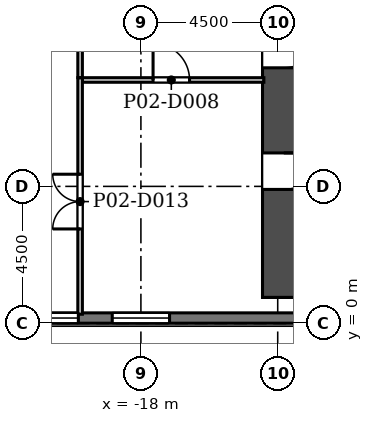
"""IFC4 building model, lengths in metres.
Left out: names, types, materials, properties, quantities, classifications, styles, units other than length and angle.
Written with IfcOpenShell. Run it as: python <this file> out.ifc"""

import sys

from ifc_helpers import new_model, si_unit, direction, frame, frame_2d, origin, place, context, subcontext, project, spatial, rectangle, extrude, element, fill, save


model = new_model("IFC4")
c1 = context("Model", 3, precision=1e-05, world=origin(), true_north=direction((0.0, 1.0)))
c2 = subcontext(c1, "Body", "Model", "MODEL_VIEW")
j1 = project(units=[si_unit("LENGTHUNIT", "METRE"), si_unit("PLANEANGLEUNIT", "RADIAN")], contexts=[c1])
p1 = place(None, origin())
s1 = spatial("IfcSite", under=j1, at=p1, CompositionType="ELEMENT")
p2 = place(p1, origin())
s2 = spatial("IfcBuilding", under=s1, at=p2, CompositionType="ELEMENT")
p3 = place(p2, frame((0.0, 0.0, 14.0)))
s3 = spatial("IfcBuildingStorey", under=s2, at=p3, CompositionType="ELEMENT", Elevation=14.0)
p4 = place(p3, frame((-14.0, 1.55, 0.0), z_axis=(0.0, 0.0, 1.0), x_axis=(1.0, 0.0, 0.0)))
e1 = element("IfcWall", 1, at=p4, inside=s3, PredefinedType="SHEAR", context=c2, shape_type="SweptSolid", body=[
    extrude(rectangle(XDim=28.0, YDim=1.4, at=frame_2d((14.0, 0.0))), origin(), (0.0, 0.0, 1.0), 6.0),
])
p5 = place(p3, frame((-13.3, 11.052, 0.0), z_axis=(0.0, 0.0, 1.0), x_axis=(0.0, -1.0, 0.0)))
e2 = element("IfcWall", 2, at=p5, inside=s3, PredefinedType="SHEAR", context=c2, shape_type="SweptSolid", body=[
    extrude(rectangle(XDim=10.202, YDim=1.4, at=frame_2d((5.101, 0.0))), origin(), (0.0, 0.0, 1.0), 6.0),
])
p6 = place(p5, frame((5.453, 0.0, 0.0)))
e3 = element("IfcOpeningElement", 3, at=p6, cuts=e2, PredefinedType="OPENING", context=c2, shape_type="SweptSolid", body=[
    extrude(rectangle(XDim=1.2, YDim=2.1, at=frame_2d((0.6, 1.05))), frame((0.0, 0.71, 0.0), z_axis=(0.0, -1.0, 0.0), x_axis=(1.0, 0.0, 0.0)), (0.0, 0.0, 1.0), 1.42),
])
p7 = place(p5, frame((1.453, 0.0, 0.0)))
e4 = element("IfcOpeningElement", 4, at=p7, cuts=e2, PredefinedType="OPENING", context=c2, shape_type="SweptSolid", body=[
    extrude(rectangle(XDim=1.2, YDim=2.1, at=frame_2d((0.6, 1.05))), frame((0.0, 0.71, 0.0), z_axis=(0.0, -1.0, 0.0), x_axis=(1.0, 0.0, 0.0)), (0.0, 0.0, 1.0), 1.42),
])
p8 = place(p3, frame((-38.0, 0.17, 0.0), z_axis=(0.0, 0.0, 1.0), x_axis=(1.0, 0.0, 0.0)))
e5 = element("IfcWall", 5, at=p8, inside=s3, PredefinedType="SOLIDWALL", context=c2, shape_type="SweptSolid", body=[
    extrude(rectangle(XDim=76.0, YDim=0.34, at=frame_2d((38.0, 0.0))), origin(), (0.0, 0.0, 1.0), 5.7),
])
p9 = place(p8, frame((1.058, 0.0, 0.9)))
e6 = element("IfcOpeningElement", 6, at=p9, cuts=e5, PredefinedType="OPENING", context=c2, shape_type="SweptSolid", body=[
    extrude(rectangle(XDim=1.885, YDim=3.5, at=frame_2d((0.942, 1.75))), frame((0.0, 0.18, 0.0), z_axis=(0.0, -1.0, 0.0), x_axis=(1.0, 0.0, 0.0)), (0.0, 0.0, 1.0), 0.36),
])
p10 = place(p8, frame((4.058, 0.0, 0.9)))
e7 = element("IfcOpeningElement", 7, at=p10, cuts=e5, PredefinedType="OPENING", context=c2, shape_type="SweptSolid", body=[
    extrude(rectangle(XDim=1.885, YDim=3.5, at=frame_2d((0.942, 1.75))), frame((0.0, 0.18, 0.0), z_axis=(0.0, -1.0, 0.0), x_axis=(1.0, 0.0, 0.0)), (0.0, 0.0, 1.0), 0.36),
])
p11 = place(p8, frame((7.058, 0.0, 0.9)))
e8 = element("IfcOpeningElement", 8, at=p11, cuts=e5, PredefinedType="OPENING", context=c2, shape_type="SweptSolid", body=[
    extrude(rectangle(XDim=1.885, YDim=3.5, at=frame_2d((0.942, 1.75))), frame((0.0, 0.18, 0.0), z_axis=(0.0, -1.0, 0.0), x_axis=(1.0, 0.0, 0.0)), (0.0, 0.0, 1.0), 0.36),
])
p12 = place(p8, frame((10.058, 0.0, 0.9)))
e9 = element("IfcOpeningElement", 9, at=p12, cuts=e5, PredefinedType="OPENING", context=c2, shape_type="SweptSolid", body=[
    extrude(rectangle(XDim=1.885, YDim=3.5, at=frame_2d((0.942, 1.75))), frame((0.0, 0.18, 0.0), z_axis=(0.0, -1.0, 0.0), x_axis=(1.0, 0.0, 0.0)), (0.0, 0.0, 1.0), 0.36),
])
p13 = place(p8, frame((13.058, 0.0, 0.9)))
e10 = element("IfcOpeningElement", 10, at=p13, cuts=e5, PredefinedType="OPENING", context=c2, shape_type="SweptSolid", body=[
    extrude(rectangle(XDim=1.885, YDim=3.5, at=frame_2d((0.942, 1.75))), frame((0.0, 0.18, 0.0), z_axis=(0.0, -1.0, 0.0), x_axis=(1.0, 0.0, 0.0)), (0.0, 0.0, 1.0), 0.36),
])
p14 = place(p8, frame((16.058, 0.0, 0.9)))
e11 = element("IfcOpeningElement", 11, at=p14, cuts=e5, PredefinedType="OPENING", context=c2, shape_type="SweptSolid", body=[
    extrude(rectangle(XDim=1.885, YDim=3.5, at=frame_2d((0.942, 1.75))), frame((0.0, 0.18, 0.0), z_axis=(0.0, -1.0, 0.0), x_axis=(1.0, 0.0, 0.0)), (0.0, 0.0, 1.0), 0.36),
])
p15 = place(p8, frame((19.058, 0.0, 0.9)))
e12 = element("IfcOpeningElement", 12, at=p15, cuts=e5, PredefinedType="OPENING", context=c2, shape_type="SweptSolid", body=[
    extrude(rectangle(XDim=1.885, YDim=3.5, at=frame_2d((0.942, 1.75))), frame((0.0, 0.18, 0.0), z_axis=(0.0, -1.0, 0.0), x_axis=(1.0, 0.0, 0.0)), (0.0, 0.0, 1.0), 0.36),
])
p16 = place(p8, frame((55.058, 0.0, 0.9)))
e13 = element("IfcOpeningElement", 13, at=p16, cuts=e5, PredefinedType="OPENING", context=c2, shape_type="SweptSolid", body=[
    extrude(rectangle(XDim=1.885, YDim=3.5, at=frame_2d((0.942, 1.75))), frame((0.0, 0.18, 0.0), z_axis=(0.0, -1.0, 0.0), x_axis=(1.0, 0.0, 0.0)), (0.0, 0.0, 1.0), 0.36),
])
p17 = place(p8, frame((58.058, 0.0, 0.9)))
e14 = element("IfcOpeningElement", 14, at=p17, cuts=e5, PredefinedType="OPENING", context=c2, shape_type="SweptSolid", body=[
    extrude(rectangle(XDim=1.885, YDim=3.5, at=frame_2d((0.942, 1.75))), frame((0.0, 0.18, 0.0), z_axis=(0.0, -1.0, 0.0), x_axis=(1.0, 0.0, 0.0)), (0.0, 0.0, 1.0), 0.36),
])
p18 = place(p8, frame((61.058, 0.0, 0.9)))
e15 = element("IfcOpeningElement", 15, at=p18, cuts=e5, PredefinedType="OPENING", context=c2, shape_type="SweptSolid", body=[
    extrude(rectangle(XDim=1.885, YDim=3.5, at=frame_2d((0.942, 1.75))), frame((0.0, 0.18, 0.0), z_axis=(0.0, -1.0, 0.0), x_axis=(1.0, 0.0, 0.0)), (0.0, 0.0, 1.0), 0.36),
])
p19 = place(p8, frame((64.058, 0.0, 0.9)))
e16 = element("IfcOpeningElement", 16, at=p19, cuts=e5, PredefinedType="OPENING", context=c2, shape_type="SweptSolid", body=[
    extrude(rectangle(XDim=1.885, YDim=3.5, at=frame_2d((0.942, 1.75))), frame((0.0, 0.18, 0.0), z_axis=(0.0, -1.0, 0.0), x_axis=(1.0, 0.0, 0.0)), (0.0, 0.0, 1.0), 0.36),
])
p20 = place(p8, frame((67.058, 0.0, 0.9)))
e17 = element("IfcOpeningElement", 17, at=p20, cuts=e5, PredefinedType="OPENING", context=c2, shape_type="SweptSolid", body=[
    extrude(rectangle(XDim=1.885, YDim=3.5, at=frame_2d((0.942, 1.75))), frame((0.0, 0.18, 0.0), z_axis=(0.0, -1.0, 0.0), x_axis=(1.0, 0.0, 0.0)), (0.0, 0.0, 1.0), 0.36),
])
p21 = place(p8, frame((70.058, 0.0, 0.9)))
e18 = element("IfcOpeningElement", 18, at=p21, cuts=e5, PredefinedType="OPENING", context=c2, shape_type="SweptSolid", body=[
    extrude(rectangle(XDim=1.885, YDim=3.5, at=frame_2d((0.942, 1.75))), frame((0.0, 0.18, 0.0), z_axis=(0.0, -1.0, 0.0), x_axis=(1.0, 0.0, 0.0)), (0.0, 0.0, 1.0), 0.36),
])
p22 = place(p8, frame((73.058, 0.0, 0.9)))
e19 = element("IfcOpeningElement", 19, at=p22, cuts=e5, PredefinedType="OPENING", context=c2, shape_type="SweptSolid", body=[
    extrude(rectangle(XDim=1.885, YDim=3.5, at=frame_2d((0.942, 1.75))), frame((0.0, 0.18, 0.0), z_axis=(0.0, -1.0, 0.0), x_axis=(1.0, 0.0, 0.0)), (0.0, 0.0, 1.0), 0.36),
])
p23 = place(p3, frame((-4.853, 74.393, 0.0), z_axis=(0.0, 0.0, 1.0), x_axis=(-0.49999894854, -0.866026010844, 0.0)))
e20 = element("IfcWall", 20, at=p23, inside=s3, PredefinedType="SOLIDWALL", context=c2, shape_type="SweptSolid", body=[
    extrude(rectangle(XDim=76.0, YDim=0.34, at=frame_2d((38.0, 0.0))), origin(), (0.0, 0.0, 1.0), 5.7),
])
p24 = place(p23, frame((1.058, 0.0, 0.9)))
e21 = element("IfcOpeningElement", 21, at=p24, cuts=e20, PredefinedType="OPENING", context=c2, shape_type="SweptSolid", body=[
    extrude(rectangle(XDim=1.885, YDim=3.5, at=frame_2d((0.942, 1.75))), frame((0.0, 0.18, 0.0), z_axis=(0.0, -1.0, 0.0), x_axis=(1.0, 0.0, 0.0)), (0.0, 0.0, 1.0), 0.36),
])
p25 = place(p23, frame((4.058, 0.0, 0.9)))
e22 = element("IfcOpeningElement", 22, at=p25, cuts=e20, PredefinedType="OPENING", context=c2, shape_type="SweptSolid", body=[
    extrude(rectangle(XDim=1.885, YDim=3.5, at=frame_2d((0.942, 1.75))), frame((0.0, 0.18, 0.0), z_axis=(0.0, -1.0, 0.0), x_axis=(1.0, 0.0, 0.0)), (0.0, 0.0, 1.0), 0.36),
])
p26 = place(p23, frame((7.058, 0.0, 0.9)))
e23 = element("IfcOpeningElement", 23, at=p26, cuts=e20, PredefinedType="OPENING", context=c2, shape_type="SweptSolid", body=[
    extrude(rectangle(XDim=1.885, YDim=3.5, at=frame_2d((0.942, 1.75))), frame((0.0, 0.18, 0.0), z_axis=(0.0, -1.0, 0.0), x_axis=(1.0, 0.0, 0.0)), (0.0, 0.0, 1.0), 0.36),
])
p27 = place(p23, frame((10.058, 0.0, 0.9)))
e24 = element("IfcOpeningElement", 24, at=p27, cuts=e20, PredefinedType="OPENING", context=c2, shape_type="SweptSolid", body=[
    extrude(rectangle(XDim=1.885, YDim=3.5, at=frame_2d((0.942, 1.75))), frame((0.0, 0.18, 0.0), z_axis=(0.0, -1.0, 0.0), x_axis=(1.0, 0.0, 0.0)), (0.0, 0.0, 1.0), 0.36),
])
p28 = place(p23, frame((13.058, 0.0, 0.9)))
e25 = element("IfcOpeningElement", 25, at=p28, cuts=e20, PredefinedType="OPENING", context=c2, shape_type="SweptSolid", body=[
    extrude(rectangle(XDim=1.885, YDim=3.5, at=frame_2d((0.942, 1.75))), frame((0.0, 0.18, 0.0), z_axis=(0.0, -1.0, 0.0), x_axis=(1.0, 0.0, 0.0)), (0.0, 0.0, 1.0), 0.36),
])
p29 = place(p23, frame((16.058, 0.0, 0.9)))
e26 = element("IfcOpeningElement", 26, at=p29, cuts=e20, PredefinedType="OPENING", context=c2, shape_type="SweptSolid", body=[
    extrude(rectangle(XDim=1.885, YDim=3.5, at=frame_2d((0.942, 1.75))), frame((0.0, 0.18, 0.0), z_axis=(0.0, -1.0, 0.0), x_axis=(1.0, 0.0, 0.0)), (0.0, 0.0, 1.0), 0.36),
])
p30 = place(p23, frame((19.058, 0.0, 0.9)))
e27 = element("IfcOpeningElement", 27, at=p30, cuts=e20, PredefinedType="OPENING", context=c2, shape_type="SweptSolid", body=[
    extrude(rectangle(XDim=1.885, YDim=3.5, at=frame_2d((0.942, 1.75))), frame((0.0, 0.18, 0.0), z_axis=(0.0, -1.0, 0.0), x_axis=(1.0, 0.0, 0.0)), (0.0, 0.0, 1.0), 0.36),
])
p31 = place(p23, frame((22.058, 0.0, 0.9)))
e28 = element("IfcOpeningElement", 28, at=p31, cuts=e20, PredefinedType="OPENING", context=c2, shape_type="SweptSolid", body=[
    extrude(rectangle(XDim=1.885, YDim=3.5, at=frame_2d((0.942, 1.75))), frame((0.0, 0.18, 0.0), z_axis=(0.0, -1.0, 0.0), x_axis=(1.0, 0.0, 0.0)), (0.0, 0.0, 1.0), 0.36),
])
p32 = place(p23, frame((25.058, 0.0, 0.9)))
e29 = element("IfcOpeningElement", 29, at=p32, cuts=e20, PredefinedType="OPENING", context=c2, shape_type="SweptSolid", body=[
    extrude(rectangle(XDim=1.885, YDim=3.5, at=frame_2d((0.942, 1.75))), frame((0.0, 0.18, 0.0), z_axis=(0.0, -1.0, 0.0), x_axis=(1.0, 0.0, 0.0)), (0.0, 0.0, 1.0), 0.36),
])
p33 = place(p23, frame((28.058, 0.0, 0.9)))
e30 = element("IfcOpeningElement", 30, at=p33, cuts=e20, PredefinedType="OPENING", context=c2, shape_type="SweptSolid", body=[
    extrude(rectangle(XDim=1.885, YDim=3.5, at=frame_2d((0.942, 1.75))), frame((0.0, 0.18, 0.0), z_axis=(0.0, -1.0, 0.0), x_axis=(1.0, 0.0, 0.0)), (0.0, 0.0, 1.0), 0.36),
])
p34 = place(p23, frame((31.058, 0.0, 0.9)))
e31 = element("IfcOpeningElement", 31, at=p34, cuts=e20, PredefinedType="OPENING", context=c2, shape_type="SweptSolid", body=[
    extrude(rectangle(XDim=1.885, YDim=3.5, at=frame_2d((0.942, 1.75))), frame((0.0, 0.18, 0.0), z_axis=(0.0, -1.0, 0.0), x_axis=(1.0, 0.0, 0.0)), (0.0, 0.0, 1.0), 0.36),
])
p35 = place(p23, frame((34.058, 0.0, 0.9)))
e32 = element("IfcOpeningElement", 32, at=p35, cuts=e20, PredefinedType="OPENING", context=c2, shape_type="SweptSolid", body=[
    extrude(rectangle(XDim=1.885, YDim=3.5, at=frame_2d((0.942, 1.75))), frame((0.0, 0.18, 0.0), z_axis=(0.0, -1.0, 0.0), x_axis=(1.0, 0.0, 0.0)), (0.0, 0.0, 1.0), 0.36),
])
p36 = place(p23, frame((37.058, 0.0, 0.9)))
e33 = element("IfcOpeningElement", 33, at=p36, cuts=e20, PredefinedType="OPENING", context=c2, shape_type="SweptSolid", body=[
    extrude(rectangle(XDim=1.885, YDim=3.5, at=frame_2d((0.942, 1.75))), frame((0.0, 0.18, 0.0), z_axis=(0.0, -1.0, 0.0), x_axis=(1.0, 0.0, 0.0)), (0.0, 0.0, 1.0), 0.36),
])
p37 = place(p23, frame((40.058, 0.0, 0.9)))
e34 = element("IfcOpeningElement", 34, at=p37, cuts=e20, PredefinedType="OPENING", context=c2, shape_type="SweptSolid", body=[
    extrude(rectangle(XDim=1.885, YDim=3.5, at=frame_2d((0.942, 1.75))), frame((0.0, 0.18, 0.0), z_axis=(0.0, -1.0, 0.0), x_axis=(1.0, 0.0, 0.0)), (0.0, 0.0, 1.0), 0.36),
])
p38 = place(p23, frame((43.058, 0.0, 0.9)))
e35 = element("IfcOpeningElement", 35, at=p38, cuts=e20, PredefinedType="OPENING", context=c2, shape_type="SweptSolid", body=[
    extrude(rectangle(XDim=1.885, YDim=3.5, at=frame_2d((0.942, 1.75))), frame((0.0, 0.18, 0.0), z_axis=(0.0, -1.0, 0.0), x_axis=(1.0, 0.0, 0.0)), (0.0, 0.0, 1.0), 0.36),
])
p39 = place(p23, frame((46.058, 0.0, 0.9)))
e36 = element("IfcOpeningElement", 36, at=p39, cuts=e20, PredefinedType="OPENING", context=c2, shape_type="SweptSolid", body=[
    extrude(rectangle(XDim=1.885, YDim=3.5, at=frame_2d((0.942, 1.75))), frame((0.0, 0.18, 0.0), z_axis=(0.0, -1.0, 0.0), x_axis=(1.0, 0.0, 0.0)), (0.0, 0.0, 1.0), 0.36),
])
p40 = place(p23, frame((49.058, 0.0, 0.9)))
e37 = element("IfcOpeningElement", 37, at=p40, cuts=e20, PredefinedType="OPENING", context=c2, shape_type="SweptSolid", body=[
    extrude(rectangle(XDim=1.885, YDim=3.5, at=frame_2d((0.942, 1.75))), frame((0.0, 0.18, 0.0), z_axis=(0.0, -1.0, 0.0), x_axis=(1.0, 0.0, 0.0)), (0.0, 0.0, 1.0), 0.36),
])
p41 = place(p23, frame((52.058, 0.0, 0.9)))
e38 = element("IfcOpeningElement", 38, at=p41, cuts=e20, PredefinedType="OPENING", context=c2, shape_type="SweptSolid", body=[
    extrude(rectangle(XDim=1.885, YDim=3.5, at=frame_2d((0.942, 1.75))), frame((0.0, 0.18, 0.0), z_axis=(0.0, -1.0, 0.0), x_axis=(1.0, 0.0, 0.0)), (0.0, 0.0, 1.0), 0.36),
])
p42 = place(p23, frame((55.058, 0.0, 0.9)))
e39 = element("IfcOpeningElement", 39, at=p42, cuts=e20, PredefinedType="OPENING", context=c2, shape_type="SweptSolid", body=[
    extrude(rectangle(XDim=1.885, YDim=3.5, at=frame_2d((0.942, 1.75))), frame((0.0, 0.18, 0.0), z_axis=(0.0, -1.0, 0.0), x_axis=(1.0, 0.0, 0.0)), (0.0, 0.0, 1.0), 0.36),
])
p43 = place(p23, frame((58.058, 0.0, 0.9)))
e40 = element("IfcOpeningElement", 40, at=p43, cuts=e20, PredefinedType="OPENING", context=c2, shape_type="SweptSolid", body=[
    extrude(rectangle(XDim=1.885, YDim=3.5, at=frame_2d((0.942, 1.75))), frame((0.0, 0.18, 0.0), z_axis=(0.0, -1.0, 0.0), x_axis=(1.0, 0.0, 0.0)), (0.0, 0.0, 1.0), 0.36),
])
p44 = place(p23, frame((61.058, 0.0, 0.9)))
e41 = element("IfcOpeningElement", 41, at=p44, cuts=e20, PredefinedType="OPENING", context=c2, shape_type="SweptSolid", body=[
    extrude(rectangle(XDim=1.885, YDim=3.5, at=frame_2d((0.942, 1.75))), frame((0.0, 0.18, 0.0), z_axis=(0.0, -1.0, 0.0), x_axis=(1.0, 0.0, 0.0)), (0.0, 0.0, 1.0), 0.36),
])
p45 = place(p23, frame((64.058, 0.0, 0.9)))
e42 = element("IfcOpeningElement", 42, at=p45, cuts=e20, PredefinedType="OPENING", context=c2, shape_type="SweptSolid", body=[
    extrude(rectangle(XDim=1.885, YDim=3.5, at=frame_2d((0.942, 1.75))), frame((0.0, 0.18, 0.0), z_axis=(0.0, -1.0, 0.0), x_axis=(1.0, 0.0, 0.0)), (0.0, 0.0, 1.0), 0.36),
])
p46 = place(p23, frame((67.058, 0.0, 0.9)))
e43 = element("IfcOpeningElement", 43, at=p46, cuts=e20, PredefinedType="OPENING", context=c2, shape_type="SweptSolid", body=[
    extrude(rectangle(XDim=1.885, YDim=3.5, at=frame_2d((0.942, 1.75))), frame((0.0, 0.18, 0.0), z_axis=(0.0, -1.0, 0.0), x_axis=(1.0, 0.0, 0.0)), (0.0, 0.0, 1.0), 0.36),
])
p47 = place(p23, frame((70.058, 0.0, 0.9)))
e44 = element("IfcOpeningElement", 44, at=p47, cuts=e20, PredefinedType="OPENING", context=c2, shape_type="SweptSolid", body=[
    extrude(rectangle(XDim=1.885, YDim=3.5, at=frame_2d((0.942, 1.75))), frame((0.0, 0.18, 0.0), z_axis=(0.0, -1.0, 0.0), x_axis=(1.0, 0.0, 0.0)), (0.0, 0.0, 1.0), 0.36),
])
p48 = place(p23, frame((73.058, 0.0, 0.9)))
e45 = element("IfcOpeningElement", 45, at=p48, cuts=e20, PredefinedType="OPENING", context=c2, shape_type="SweptSolid", body=[
    extrude(rectangle(XDim=1.885, YDim=3.5, at=frame_2d((0.942, 1.75))), frame((0.0, 0.18, 0.0), z_axis=(0.0, -1.0, 0.0), x_axis=(1.0, 0.0, 0.0)), (0.0, 0.0, 1.0), 0.36),
])
p49 = place(p3, frame((-19.925, 8.0, 0.0), z_axis=(0.0, 0.0, 1.0), x_axis=(1.0, 0.0, 0.0)))
e46 = element("IfcWall", 46, at=p49, inside=s3, PredefinedType="PARTITIONING", context=c2, shape_type="SweptSolid", body=[
    extrude(rectangle(XDim=5.97, YDim=0.15, at=frame_2d((2.985, 0.0))), origin(), (0.0, 0.0, 1.0), 5.7),
])
p50 = place(p49, frame((2.325, 0.0, 0.0)))
e47 = element("IfcOpeningElement", 47, at=p50, cuts=e46, PredefinedType="OPENING", context=c2, shape_type="SweptSolid", body=[
    extrude(rectangle(XDim=1.2, YDim=2.1, at=frame_2d((0.6, 1.05))), frame((0.0, 0.085, 0.0), z_axis=(0.0, -1.0, 0.0), x_axis=(1.0, 0.0, 0.0)), (0.0, 0.0, 1.0), 0.17),
])
p51 = place(p3, frame((-20.0, 8.075, 0.0), z_axis=(0.0, 0.0, 1.0), x_axis=(0.0, -1.0, 0.0)))
e48 = element("IfcWall", 48, at=p51, inside=s3, PredefinedType="PARTITIONING", context=c2, shape_type="SweptSolid", body=[
    extrude(rectangle(XDim=7.78, YDim=0.15, at=frame_2d((3.89, 0.0))), origin(), (0.0, 0.0, 1.0), 5.7),
])
p52 = place(p51, frame((3.175, 0.0, 0.0)))
e49 = element("IfcOpeningElement", 49, at=p52, cuts=e48, PredefinedType="OPENING", context=c2, shape_type="SweptSolid", body=[
    extrude(rectangle(XDim=1.8, YDim=2.1, at=frame_2d((0.9, 1.05))), frame((0.0, 0.085, 0.0), z_axis=(0.0, -1.0, 0.0), x_axis=(1.0, 0.0, 0.0)), (0.0, 0.0, 1.0), 0.17),
])
p53 = place(p3, frame((-20.0, 9.925, 0.0), z_axis=(0.0, 0.0, 1.0), x_axis=(0.0, -1.0, 0.0)))
e50 = element("IfcWall", 50, at=p53, inside=s3, PredefinedType="PARTITIONING", context=c2, shape_type="SweptSolid", body=[
    extrude(rectangle(XDim=1.85, YDim=0.15, at=frame_2d((0.925, 0.0))), origin(), (0.0, 0.0, 1.0), 5.7),
])
p54 = place(p14, origin())
e51 = element("IfcWindow", 51, at=p54, inside=s3, PartitioningType="SINGLE_PANEL", PredefinedType="WINDOW", context=c2, shape_type="SweptSolid", body=[
    extrude(rectangle(XDim=1.885, YDim=3.5, at=frame_2d((0.942, 1.75))), frame((0.0, 0.11, 0.0), z_axis=(0.0, -1.0, 0.0), x_axis=(1.0, 0.0, 0.0)), (0.0, 0.0, 1.0), 0.06),
])
fill(e11, e51)
p55 = place(p15, origin())
e52 = element("IfcWindow", 52, at=p55, inside=s3, PartitioningType="SINGLE_PANEL", PredefinedType="WINDOW", context=c2, shape_type="SweptSolid", body=[
    extrude(rectangle(XDim=1.885, YDim=3.5, at=frame_2d((0.942, 1.75))), frame((0.0, 0.11, 0.0), z_axis=(0.0, -1.0, 0.0), x_axis=(1.0, 0.0, 0.0)), (0.0, 0.0, 1.0), 0.06),
])
fill(e12, e52)
p56 = place(p6, origin())
e53 = element("IfcDoor", 53, at=p56, inside=s3, OperationType="SINGLE_SWING_LEFT", PredefinedType="DOOR", context=c2, shape_type="SweptSolid", body=[
    extrude(rectangle(XDim=1.2, YDim=2.1, at=frame_2d((0.6, 1.05))), frame((0.0, 0.025, 0.0), z_axis=(0.0, -1.0, 0.0), x_axis=(1.0, 0.0, 0.0)), (0.0, 0.0, 1.0), 0.05),
])
fill(e3, e53)
p57 = place(p7, origin())
e54 = element("IfcDoor", 54, at=p57, inside=s3, OperationType="SINGLE_SWING_LEFT", PredefinedType="DOOR", context=c2, shape_type="SweptSolid", body=[
    extrude(rectangle(XDim=1.2, YDim=2.1, at=frame_2d((0.6, 1.05))), frame((0.0, 0.025, 0.0), z_axis=(0.0, -1.0, 0.0), x_axis=(1.0, 0.0, 0.0)), (0.0, 0.0, 1.0), 0.05),
])
fill(e4, e54)
p58 = place(p50, origin())
e55 = element("IfcDoor", 55, at=p58, inside=s3, OperationType="SINGLE_SWING_LEFT", PredefinedType="DOOR", context=c2, shape_type="SweptSolid", body=[
    extrude(rectangle(XDim=1.2, YDim=2.1, at=frame_2d((0.6, 1.05))), frame((0.0, 0.025, 0.0), z_axis=(0.0, -1.0, 0.0), x_axis=(1.0, 0.0, 0.0)), (0.0, 0.0, 1.0), 0.05),
])
fill(e47, e55)
p59 = place(p52, frame((1.8, 0.0, 0.0), z_axis=(0.0, 0.0, 1.0), x_axis=(-1.0, 0.0, 0.0)))
e56 = element("IfcDoor", 56, at=p59, inside=s3, OperationType="DOUBLE_DOOR_SINGLE_SWING", PredefinedType="DOOR", context=c2, shape_type="SweptSolid", body=[
    extrude(rectangle(XDim=1.8, YDim=2.1, at=frame_2d((0.9, 1.05))), frame((0.0, 0.025, 0.0), z_axis=(0.0, -1.0, 0.0), x_axis=(1.0, 0.0, 0.0)), (0.0, 0.0, 1.0), 0.05),
])
fill(e49, e56)
save(model, sys.argv[1])
